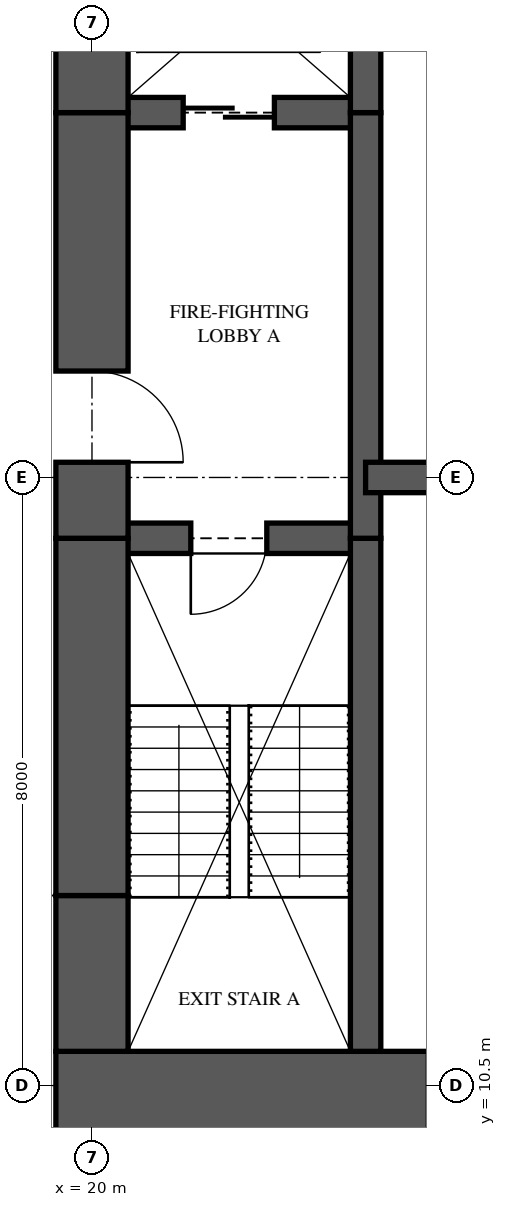
"""IFC4 building model, lengths in metres.
Left out: names, types, materials, properties, quantities, classifications, styles, units other than length and angle.
Written with IfcOpenShell. Run it as: python <this file> out.ifc"""

import sys

from ifc_helpers import new_model, si_unit, direction, frame, frame_2d, origin, place, context, subcontext, project, spatial, rectangle, extrude, element, fill, save


model = new_model("IFC4")
c1 = context("Model", 3, precision=1e-05, world=origin(), true_north=direction((0.0, 1.0)))
c2 = subcontext(c1, "Body", "Model", "MODEL_VIEW")
j1 = project(units=[si_unit("LENGTHUNIT", "METRE"), si_unit("PLANEANGLEUNIT", "RADIAN")], contexts=[c1])
p1 = place(None, origin())
s1 = spatial("IfcSite", under=j1, at=p1, CompositionType="ELEMENT")
p2 = place(p1, origin())
s2 = spatial("IfcBuilding", under=s1, at=p2, CompositionType="ELEMENT")
p3 = place(p2, frame((0.0, 0.0, 24.35)))
s3 = spatial("IfcBuildingStorey", under=s2, at=p3, CompositionType="ELEMENT", Elevation=24.35)
p4 = place(p3, frame((19.525, 10.125, 0.0), z_axis=(0.0, 0.0, 1.0), x_axis=(1.0, 0.0, 0.0)))
e1 = element("IfcWall", 1, at=p4, inside=s3, PredefinedType="SHEAR", context=c2, shape_type="SweptSolid", body=[
    extrude(rectangle(XDim=6.475, YDim=1.65, at=frame_2d((3.238, 0.0))), origin(), (0.0, 0.0, 1.0), 3.35),
])
p5 = place(p4, frame((4.9, 0.0, 0.0)))
e2 = element("IfcOpeningElement", 2, at=p5, cuts=e1, PredefinedType="OPENING", context=c2, shape_type="SweptSolid", body=[
    extrude(rectangle(XDim=0.75, YDim=2.1, at=frame_2d((0.375, 1.05))), frame((0.0, 0.835, 0.0), z_axis=(0.0, -1.0, 0.0), x_axis=(1.0, 0.0, 0.0)), (0.0, 0.0, 1.0), 1.67),
])
p6 = place(p3, frame((20.0, 26.05, 0.0), z_axis=(0.0, 0.0, 1.0), x_axis=(0.0, -1.0, 0.0)))
e3 = element("IfcWall", 3, at=p6, inside=s3, PredefinedType="SHEAR", context=c2, shape_type="SweptSolid", body=[
    extrude(rectangle(XDim=2.75, YDim=0.95, at=frame_2d((1.375, 0.0))), origin(), (0.0, 0.0, 1.0), 3.35),
])
p7 = place(p3, frame((20.0, 23.3, 0.0), z_axis=(0.0, 0.0, 1.0), x_axis=(0.0, -1.0, 0.0)))
e4 = element("IfcWall", 4, at=p7, inside=s3, PredefinedType="SHEAR", context=c2, shape_type="SweptSolid", body=[
    extrude(rectangle(XDim=5.6, YDim=0.95, at=frame_2d((2.8, 0.0))), origin(), (0.0, 0.0, 1.0), 3.35),
])
p8 = place(p7, frame((3.4, 0.0, 0.0)))
e5 = element("IfcOpeningElement", 5, at=p8, cuts=e4, PredefinedType="OPENING", context=c2, shape_type="SweptSolid", body=[
    extrude(rectangle(XDim=1.2, YDim=2.2, at=frame_2d((0.6, 1.1))), frame((0.0, 0.485, 0.0), z_axis=(0.0, -1.0, 0.0), x_axis=(1.0, 0.0, 0.0)), (0.0, 0.0, 1.0), 0.97),
])
p9 = place(p3, frame((20.0, 17.7, 0.0), z_axis=(0.0, 0.0, 1.0), x_axis=(0.0, -1.0, 0.0)))
e6 = element("IfcWall", 6, at=p9, inside=s3, PredefinedType="SHEAR", context=c2, shape_type="SweptSolid", body=[
    extrude(rectangle(XDim=4.7, YDim=0.95, at=frame_2d((2.35, 0.0))), origin(), (0.0, 0.0, 1.0), 3.35),
])
p10 = place(p3, frame((20.0, 13.0, 0.0), z_axis=(0.0, 0.0, 1.0), x_axis=(0.0, -1.0, 0.0)))
e7 = element("IfcWall", 7, at=p10, inside=s3, PredefinedType="SHEAR", context=c2, shape_type="SweptSolid", body=[
    extrude(rectangle(XDim=2.05, YDim=0.95, at=frame_2d((1.025, 0.0))), origin(), (0.0, 0.0, 1.0), 3.35),
])
p11 = place(p3, frame((23.6, 10.95, 0.0), z_axis=(0.0, 0.0, 1.0), x_axis=(0.0, 1.0, 0.0)))
e8 = element("IfcWall", 8, at=p11, inside=s3, PredefinedType="SHEAR", context=c2, shape_type="SweptSolid", body=[
    extrude(rectangle(XDim=6.75, YDim=0.4, at=frame_2d((3.375, 0.0))), origin(), (0.0, 0.0, 1.0), 3.35),
])
p12 = place(p3, frame((23.6, 17.7, 0.0), z_axis=(0.0, 0.0, 1.0), x_axis=(0.0, 1.0, 0.0)))
e9 = element("IfcWall", 9, at=p12, inside=s3, PredefinedType="SHEAR", context=c2, shape_type="SweptSolid", body=[
    extrude(rectangle(XDim=5.6, YDim=0.4, at=frame_2d((2.8, 0.0))), origin(), (0.0, 0.0, 1.0), 3.35),
])
p13 = place(p3, frame((23.6, 23.3, 0.0), z_axis=(0.0, 0.0, 1.0), x_axis=(0.0, 1.0, 0.0)))
e10 = element("IfcWall", 10, at=p13, inside=s3, PredefinedType="SHEAR", context=c2, shape_type="SweptSolid", body=[
    extrude(rectangle(XDim=2.75, YDim=0.4, at=frame_2d((1.375, 0.0))), origin(), (0.0, 0.0, 1.0), 3.35),
])
p14 = place(p3, frame((20.0, 17.7, 0.0), z_axis=(0.0, 0.0, 1.0), x_axis=(1.0, 0.0, 0.0)))
e11 = element("IfcWall", 11, at=p14, inside=s3, PredefinedType="SHEAR", context=c2, shape_type="SweptSolid", body=[
    extrude(rectangle(XDim=3.6, YDim=0.4, at=frame_2d((1.8, 0.0))), origin(), (0.0, 0.0, 1.0), 3.35),
])
p15 = place(p14, frame((1.3, 0.0, 0.0)))
e12 = element("IfcOpeningElement", 12, at=p15, cuts=e11, PredefinedType="OPENING", context=c2, shape_type="SweptSolid", body=[
    extrude(rectangle(XDim=1.0, YDim=2.1, at=frame_2d((0.5, 1.05))), frame((0.0, 0.21, 0.0), z_axis=(0.0, -1.0, 0.0), x_axis=(1.0, 0.0, 0.0)), (0.0, 0.0, 1.0), 0.42),
])
p16 = place(p3, frame((20.0, 23.3, 0.0), z_axis=(0.0, 0.0, 1.0), x_axis=(1.0, 0.0, 0.0)))
e13 = element("IfcWall", 13, at=p16, inside=s3, PredefinedType="SHEAR", context=c2, shape_type="SweptSolid", body=[
    extrude(rectangle(XDim=3.6, YDim=0.4, at=frame_2d((1.8, 0.0))), origin(), (0.0, 0.0, 1.0), 3.35),
])
p17 = place(p16, frame((1.2, 0.0, 0.0)))
e14 = element("IfcOpeningElement", 14, at=p17, cuts=e13, PredefinedType="OPENING", context=c2, shape_type="SweptSolid", body=[
    extrude(rectangle(XDim=1.2, YDim=2.1, at=frame_2d((0.6, 1.05))), frame((0.0, 0.21, 0.0), z_axis=(0.0, -1.0, 0.0), x_axis=(1.0, 0.0, 0.0)), (0.0, 0.0, 1.0), 0.42),
])
p18 = place(p3, frame((23.6, 18.5, 0.0), z_axis=(0.0, 0.0, 1.0), x_axis=(1.0, 0.0, 0.0)))
e15 = element("IfcWall", 15, at=p18, inside=s3, PredefinedType="SHEAR", context=c2, shape_type="SweptSolid", body=[
    extrude(rectangle(XDim=2.4, YDim=0.4, at=frame_2d((1.2, 0.0))), origin(), (0.0, 0.0, 1.0), 3.35),
])
p19 = place(p15, frame((1.0, 0.0, 0.0), z_axis=(0.0, 0.0, 1.0), x_axis=(-1.0, 0.0, 0.0)))
e16 = element("IfcDoor", 16, at=p19, inside=s3, OperationType="SINGLE_SWING_RIGHT", PredefinedType="DOOR", context=c2, shape_type="SweptSolid", body=[
    extrude(rectangle(XDim=1.0, YDim=2.1, at=frame_2d((0.5, 1.05))), frame((0.0, 0.025, 0.0), z_axis=(0.0, -1.0, 0.0), x_axis=(1.0, 0.0, 0.0)), (0.0, 0.0, 1.0), 0.05),
])
fill(e12, e16)
p20 = place(p8, origin())
e17 = element("IfcDoor", 17, at=p20, inside=s3, OperationType="SINGLE_SWING_RIGHT", PredefinedType="DOOR", context=c2, shape_type="SweptSolid", body=[
    extrude(rectangle(XDim=1.2, YDim=2.2, at=frame_2d((0.6, 1.1))), frame((0.0, 0.025, 0.0), z_axis=(0.0, -1.0, 0.0), x_axis=(1.0, 0.0, 0.0)), (0.0, 0.0, 1.0), 0.05),
])
fill(e5, e17)
p21 = place(p17, origin())
e18 = element("IfcDoor", 18, at=p21, inside=s3, OperationType="SLIDING_TO_LEFT", PredefinedType="DOOR", context=c2, shape_type="SweptSolid", body=[
    extrude(rectangle(XDim=1.2, YDim=2.1, at=frame_2d((0.6, 1.05))), frame((0.0, 0.025, 0.0), z_axis=(0.0, -1.0, 0.0), x_axis=(1.0, 0.0, 0.0)), (0.0, 0.0, 1.0), 0.05),
])
fill(e14, e18)
save(model, sys.argv[1])
